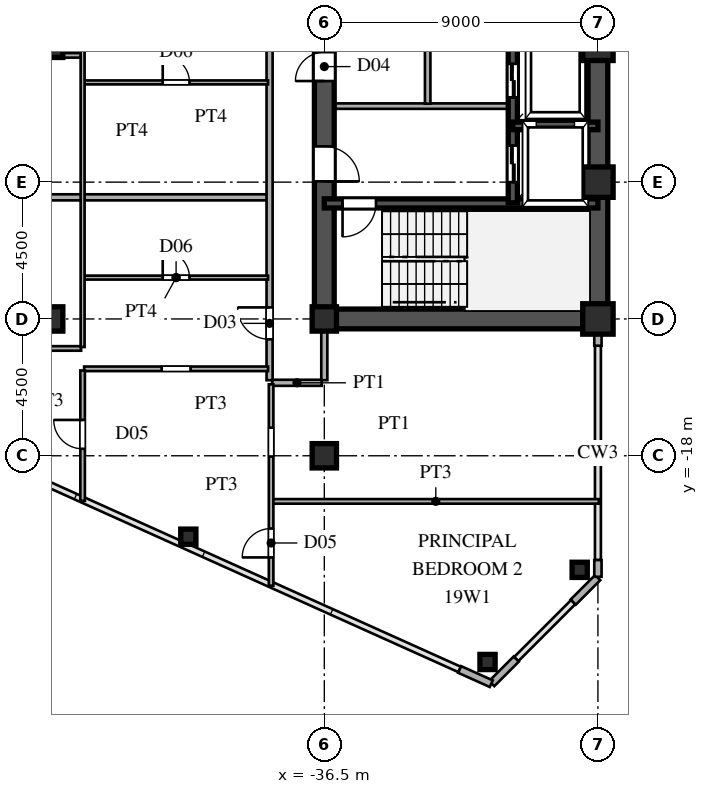
"""IFC4 building model, lengths in metres.
Left out: names, types, materials, properties, quantities, classifications, styles, units other than length and angle.
Written with IfcOpenShell. Run it as: python <this file> out.ifc"""

import sys

from ifc_helpers import new_model, si_unit, direction, frame, frame_2d, origin, origin_2d, place, context, subcontext, project, spatial, rectangle, hollow_rectangle, i_section, extrude, source, transform, mapped, element, fill, save


model = new_model("IFC4")
c1 = context("Model", 3, precision=1e-05, world=origin(), true_north=direction((0.0, 1.0)))
c2 = subcontext(c1, "Body", "Model", "MODEL_VIEW")
j1 = project(units=[si_unit("LENGTHUNIT", "METRE"), si_unit("PLANEANGLEUNIT", "RADIAN")], contexts=[c1])
p1 = place(None, origin())
s1 = spatial("IfcSite", under=j1, at=p1, CompositionType="ELEMENT")
p2 = place(p1, origin())
s2 = spatial("IfcBuilding", under=s1, at=p2, CompositionType="ELEMENT")
p3 = place(p2, frame((0.0, 0.0, 72.9)))
s3 = spatial("IfcBuildingStorey", under=s2, at=p3, CompositionType="ELEMENT", Elevation=72.9)
m1 = source(origin(), c2, "Body", "SweptSolid", [
    extrude(hollow_rectangle(XDim=1.0, YDim=1.0, WallThickness=0.042, at=origin_2d()), origin(), (0.0, 0.0, 1.0), 3.6),
])
for number, where, z_axis, x_axis in (
    (1, (-27.5, -13.5, 0.0), (0.0, 0.0, 1.0), (1.0, 0.0, 0.0)),
    (2, (-27.5, -9.0, 0.0), (0.0, 0.0, 1.0), (1.0, 0.0, 0.0)),
    (3, (-27.5, -4.5, 0.0), (0.0, 0.0, 1.0), (1.0, 0.0, 0.0)),
):
    element("IfcColumn", number, at=place(p3, frame(where, z_axis=z_axis, x_axis=x_axis)), inside=s3, PredefinedType="COLUMN", context=c2, shape_type="MappedRepresentation", body=[
        mapped(m1, transform((0.0, 0.0, 0.0), scale=1.0)),
    ])
m2 = source(origin(), c2, "Body", "SweptSolid", [
    extrude(i_section(OverallWidth=0.8, OverallDepth=0.8, WebThickness=0.032, FlangeThickness=0.05, at=origin_2d()), origin(), (0.0, 0.0, 1.0), 3.6),
])
for number, where, z_axis, x_axis in (
    (4, (-36.5, -18.0, 0.0), (0.0, 0.0, 1.0), (1.0, 0.0, 0.0)),
    (5, (-36.5, -13.5, 0.0), (0.0, 0.0, 1.0), (1.0, 0.0, 0.0)),
    (6, (-45.5, -13.5, 0.0), (0.0, 0.0, 1.0), (1.0, 0.0, 0.0)),
    (7, (-45.5, -4.5, 0.0), (0.0, 0.0, 1.0), (1.0, 0.0, 0.0)),
):
    element("IfcColumn", number, at=place(p3, frame(where, z_axis=z_axis, x_axis=x_axis)), inside=s3, PredefinedType="COLUMN", context=c2, shape_type="MappedRepresentation", body=[
        mapped(m2, transform((0.0, 0.0, 0.0), scale=1.0)),
    ])
m3 = source(origin(), c2, "Body", "SweptSolid", [
    extrude(hollow_rectangle(XDim=0.5, YDim=0.5, WallThickness=0.02, at=origin_2d()), origin(), (0.0, 0.0, 1.0), 3.6),
])
for number, where, z_axis, x_axis in (
    (8, (-28.1, -21.751, 0.0), (0.0, 0.0, 1.0), (1.0, 0.0, 0.0)),
    (9, (-31.131, -24.783, 0.0), (0.0, 0.0, 1.0), (1.0, 0.0, 0.0)),
    (10, (-40.973, -20.661, 0.0), (0.0, 0.0, 1.0), (1.0, 0.0, 0.0)),
):
    element("IfcColumn", number, at=place(p3, frame(where, z_axis=z_axis, x_axis=x_axis)), inside=s3, PredefinedType="COLUMN", context=c2, shape_type="MappedRepresentation", body=[
        mapped(m3, transform((0.0, 0.0, 0.0), scale=1.0)),
    ])
p4 = place(p3, frame((-27.5, -21.98, 0.0), z_axis=(0.0, 0.0, 1.0), x_axis=(0.0, 1.0, 0.0)))
e11 = element("IfcWall", 11, at=p4, inside=s3, PredefinedType="SOLIDWALL", context=c2, shape_type="SweptSolid", body=[
    extrude(rectangle(XDim=0.55, YDim=0.24, at=frame_2d((0.275, 0.0))), origin(), (0.0, 0.0, 1.0), 3.38),
])
p5 = place(p3, frame((-27.5, -14.38, 0.0), z_axis=(0.0, 0.0, 1.0), x_axis=(0.0, 1.0, 0.0)))
e12 = element("IfcWall", 12, at=p5, inside=s3, PredefinedType="SOLIDWALL", context=c2, shape_type="SweptSolid", body=[
    extrude(rectangle(XDim=0.55, YDim=0.24, at=frame_2d((0.275, 0.0))), origin(), (0.0, 0.0, 1.0), 2.88),
])
p6 = place(p3, frame((-32.049, -25.028, 0.0), z_axis=(0.0, 0.0, 1.0), x_axis=(0.911929519623, -0.410346866979, 0.0)))
e13 = element("IfcWall", 13, at=p6, inside=s3, PredefinedType="SOLIDWALL", context=c2, shape_type="SweptSolid", body=[
    extrude(rectangle(XDim=1.14, YDim=0.24, at=frame_2d((0.57, 0.0))), origin(), (0.0, 0.0, 1.0), 3.38),
])
for number, where, z_axis, x_axis in (
    (14, (-30.993, -25.493, 0.0), (0.0, 0.0, 1.0), (0.707, 0.707, 0.0)),
    (15, (-28.313, -22.813, 0.0), (0.0, 0.0, 1.0), (0.707, 0.707, 0.0)),
):
    element("IfcWall", number, at=place(p3, frame(where, z_axis=z_axis, x_axis=x_axis)), inside=s3, PredefinedType="SOLIDWALL", context=c2, shape_type="SweptSolid", body=[
        extrude(rectangle(XDim=1.14, YDim=0.24, at=frame_2d((0.57, 0.0))), origin(), (0.0, 0.0, 1.0), 3.38),
    ])
p7 = place(p3, frame((-27.5, -13.5, 0.0), z_axis=(0.0, 0.0, 1.0), x_axis=(0.0, 1.0, 0.0)))
e16 = element("IfcWall", 16, at=p7, inside=s3, PredefinedType="SHEAR", context=c2, shape_type="SweptSolid", body=[
    extrude(rectangle(XDim=12.2, YDim=0.65, at=frame_2d((6.1, 0.0))), origin(), (0.0, 0.0, 1.0), 3.38),
])
p8 = place(p3, frame((-36.5, -13.5, 0.0), z_axis=(0.0, 0.0, 1.0), x_axis=(1.0, 0.0, 0.0)))
e17 = element("IfcWall", 17, at=p8, inside=s3, PredefinedType="SHEAR", context=c2, shape_type="SweptSolid", body=[
    extrude(rectangle(XDim=9.0, YDim=0.65, at=frame_2d((4.5, 0.0))), origin(), (0.0, 0.0, 1.0), 3.38),
])
p9 = place(p3, frame((-36.5, -13.65, 0.0), z_axis=(0.0, 0.0, 1.0), x_axis=(0.0, 1.0, 0.0)))
e18 = element("IfcWall", 18, at=p9, inside=s3, PredefinedType="SHEAR", context=c2, shape_type="SweptSolid", body=[
    extrude(rectangle(XDim=7.15, YDim=0.65, at=frame_2d((3.575, 0.0))), origin(), (0.0, 0.0, 1.0), 3.38),
])
p10 = place(p9, frame((4.675, 0.0, 0.0)))
e19 = element("IfcOpeningElement", 19, at=p10, cuts=e18, PredefinedType="OPENING", context=c2, shape_type="SweptSolid", body=[
    extrude(rectangle(XDim=1.15, YDim=2.2, at=frame_2d((0.575, 1.1))), frame((0.0, 0.335, 0.0), z_axis=(0.0, -1.0, 0.0), x_axis=(1.0, 0.0, 0.0)), (0.0, 0.0, 1.0), 0.67),
])
p11 = place(p3, frame((-36.5, -6.5, 0.0), z_axis=(0.0, 0.0, 1.0), x_axis=(0.0, 1.0, 0.0)))
e20 = element("IfcWall", 20, at=p11, inside=s3, PredefinedType="SHEAR", context=c2, shape_type="SweptSolid", body=[
    extrude(rectangle(XDim=2.6, YDim=0.65, at=frame_2d((1.3, 0.0))), origin(), (0.0, 0.0, 1.0), 3.38),
])
p12 = place(p11, frame((0.825, 0.0, 0.0)))
e21 = element("IfcOpeningElement", 21, at=p12, cuts=e20, PredefinedType="OPENING", context=c2, shape_type="SweptSolid", body=[
    extrude(rectangle(XDim=0.95, YDim=2.15, at=frame_2d((0.475, 1.075))), frame((0.0, 0.335, 0.0), z_axis=(0.0, -1.0, 0.0), x_axis=(1.0, 0.0, 0.0)), (0.0, 0.0, 1.0), 0.67),
])
p13 = place(p3, frame((-36.5, -9.7, 0.0), z_axis=(0.0, 0.0, 1.0), x_axis=(1.0, 0.0, 0.0)))
e22 = element("IfcWall", 22, at=p13, inside=s3, PredefinedType="SHEAR", context=c2, shape_type="SweptSolid", body=[
    extrude(rectangle(XDim=9.0, YDim=0.3, at=frame_2d((4.5, 0.0))), origin(), (0.0, 0.0, 1.0), 3.38),
])
p14 = place(p13, frame((0.6, 0.0, 0.0)))
e23 = element("IfcOpeningElement", 23, at=p14, cuts=e22, PredefinedType="OPENING", context=c2, shape_type="SweptSolid", body=[
    extrude(rectangle(XDim=1.1, YDim=2.2, at=frame_2d((0.55, 1.1))), frame((0.0, 0.16, 0.0), z_axis=(0.0, -1.0, 0.0), x_axis=(1.0, 0.0, 0.0)), (0.0, 0.0, 1.0), 0.32),
])
p15 = place(p3, frame((-30.3, -7.15, 0.0), z_axis=(0.0, 0.0, 1.0), x_axis=(1.0, 0.0, 0.0)))
e24 = element("IfcWall", 24, at=p15, inside=s3, PredefinedType="SHEAR", context=c2, shape_type="SweptSolid", body=[
    extrude(rectangle(XDim=2.8, YDim=0.25, at=frame_2d((1.4, 0.0))), origin(), (0.0, 0.0, 1.0), 3.38),
])
p16 = place(p3, frame((-30.3, -9.68, 0.0), z_axis=(0.0, 0.0, 1.0), x_axis=(0.0, 1.0, 0.0)))
e25 = element("IfcWall", 25, at=p16, inside=s3, PredefinedType="SHEAR", context=c2, shape_type="SweptSolid", body=[
    extrude(rectangle(XDim=2.56, YDim=0.3, at=frame_2d((1.28, 0.0))), origin(), (0.0, 0.0, 1.0), 3.38),
])
p17 = place(p16, frame((0.68, 0.0, 0.0)))
e26 = element("IfcOpeningElement", 26, at=p17, cuts=e25, PredefinedType="OPENING", context=c2, shape_type="SweptSolid", body=[
    extrude(rectangle(XDim=1.2, YDim=2.25, at=frame_2d((0.6, 1.125))), frame((0.0, 0.16, 0.0), z_axis=(0.0, -1.0, 0.0), x_axis=(1.0, 0.0, 0.0)), (0.0, 0.0, 1.0), 0.32),
])
p18 = place(p3, frame((-30.3, -7.12, 0.0), z_axis=(0.0, 0.0, 1.0), x_axis=(0.0, 1.0, 0.0)))
e27 = element("IfcWall", 27, at=p18, inside=s3, PredefinedType="SHEAR", context=c2, shape_type="SweptSolid", body=[
    extrude(rectangle(XDim=2.92, YDim=0.3, at=frame_2d((1.46, 0.0))), origin(), (0.0, 0.0, 1.0), 3.38),
])
p19 = place(p18, frame((0.91, 0.0, 0.0)))
e28 = element("IfcOpeningElement", 28, at=p19, cuts=e27, PredefinedType="OPENING", context=c2, shape_type="SweptSolid", body=[
    extrude(rectangle(XDim=1.1, YDim=2.2, at=frame_2d((0.55, 1.1))), frame((0.0, 0.16, 0.0), z_axis=(0.0, -1.0, 0.0), x_axis=(1.0, 0.0, 0.0)), (0.0, 0.0, 1.0), 0.32),
])
p20 = place(p3, frame((-36.15, -6.5, 0.0), z_axis=(0.0, 0.0, 1.0), x_axis=(1.0, 0.0, 0.0)))
e29 = element("IfcWall", 29, at=p20, inside=s3, PredefinedType="PARTITIONING", context=c2, shape_type="SweptSolid", body=[
    extrude(rectangle(XDim=5.7, YDim=0.18, at=frame_2d((2.85, 0.0))), origin(), (0.0, 0.0, 1.0), 3.38),
])
p21 = place(p3, frame((-33.1, -6.42, 0.0), z_axis=(0.0, 0.0, 1.0), x_axis=(0.0, 1.0, 0.0)))
e30 = element("IfcWall", 30, at=p21, inside=s3, PredefinedType="PARTITIONING", context=c2, shape_type="SweptSolid", body=[
    extrude(rectangle(XDim=5.04, YDim=0.18, at=frame_2d((2.52, 0.0))), origin(), (0.0, 0.0, 1.0), 3.38),
])
p22 = place(p3, frame((-38.2, -19.5, 0.0), z_axis=(0.0, 0.0, 1.0), x_axis=(1.0, 0.0, 0.0)))
e31 = element("IfcWall", 31, at=p22, inside=s3, PredefinedType="PARTITIONING", context=c2, shape_type="SweptSolid", body=[
    extrude(rectangle(XDim=10.735, YDim=0.15, at=frame_2d((5.367, 0.0))), origin(), (0.0, 0.0, 1.0), 3.38),
])
p23 = place(p3, frame((-38.215, -15.6, 0.0), z_axis=(0.0, 0.0, 1.0), x_axis=(1.0, 0.0, 0.0)))
e32 = element("IfcWall", 32, at=p23, inside=s3, PredefinedType="PARTITIONING", context=c2, shape_type="SweptSolid", body=[
    extrude(rectangle(XDim=1.63, YDim=0.2, at=frame_2d((0.815, 0.0))), origin(), (0.0, 0.0, 1.0), 3.38),
])
p24 = place(p3, frame((-44.4, -15.14, 0.0), z_axis=(0.0, 0.0, 1.0), x_axis=(1.0, 0.0, 0.0)))
e33 = element("IfcWall", 33, at=p24, inside=s3, PredefinedType="PARTITIONING", context=c2, shape_type="SweptSolid", body=[
    extrude(rectangle(XDim=6.05, YDim=0.15, at=frame_2d((3.025, 0.0))), origin(), (0.0, 0.0, 1.0), 3.38),
])
p25 = place(p24, frame((2.55, 0.0, 0.0)))
e34 = element("IfcOpeningElement", 34, at=p25, cuts=e33, PredefinedType="OPENING", context=c2, shape_type="SweptSolid", body=[
    extrude(rectangle(XDim=0.95, YDim=2.15, at=frame_2d((0.475, 1.075))), frame((0.0, 0.085, 0.0), z_axis=(0.0, -1.0, 0.0), x_axis=(1.0, 0.0, 0.0)), (0.0, 0.0, 1.0), 0.17),
])
p26 = place(p3, frame((-54.45, -14.47, 0.0), z_axis=(0.0, 0.0, 1.0), x_axis=(1.0, 0.0, 0.0)))
e35 = element("IfcWall", 35, at=p26, inside=s3, PredefinedType="PARTITIONING", context=c2, shape_type="SweptSolid", body=[
    extrude(rectangle(XDim=9.95, YDim=0.15, at=frame_2d((4.975, 0.0))), origin(), (0.0, 0.0, 1.0), 3.38),
])
p27 = place(p26, frame((4.5, 0.0, 0.0)))
e36 = element("IfcOpeningElement", 36, at=p27, cuts=e35, PredefinedType="OPENING", context=c2, shape_type="SweptSolid", body=[
    extrude(rectangle(XDim=0.95, YDim=2.15, at=frame_2d((0.475, 1.075))), frame((0.0, 0.085, 0.0), z_axis=(0.0, -1.0, 0.0), x_axis=(1.0, 0.0, 0.0)), (0.0, 0.0, 1.0), 0.17),
])
p28 = place(p3, frame((-44.4, -12.14, 0.0), z_axis=(0.0, 0.0, 1.0), x_axis=(1.0, 0.0, 0.0)))
e37 = element("IfcWall", 37, at=p28, inside=s3, PredefinedType="PARTITIONING", context=c2, shape_type="SweptSolid", body=[
    extrude(rectangle(XDim=6.05, YDim=0.13, at=frame_2d((3.025, 0.0))), origin(), (0.0, 0.0, 1.0), 3.38),
])
p29 = place(p28, frame((2.585, 0.0, 0.0)))
e38 = element("IfcOpeningElement", 38, at=p29, cuts=e37, PredefinedType="OPENING", context=c2, shape_type="SweptSolid", body=[
    extrude(rectangle(XDim=0.88, YDim=2.1, at=frame_2d((0.44, 1.05))), frame((0.0, 0.075, 0.0), z_axis=(0.0, -1.0, 0.0), x_axis=(1.0, 0.0, 0.0)), (0.0, 0.0, 1.0), 0.15),
])
p30 = place(p3, frame((-66.568, -9.5, 0.0), z_axis=(0.0, 0.0, 1.0), x_axis=(1.0, 0.0, 0.0)))
e39 = element("IfcWall", 39, at=p30, inside=s3, PredefinedType="PARTITIONING", context=c2, shape_type="SweptSolid", body=[
    extrude(rectangle(XDim=28.188, YDim=0.2, at=frame_2d((14.094, 0.0))), origin(), (0.0, 0.0, 1.0), 3.38),
])
p31 = place(p3, frame((-44.4, -5.72, 0.0), z_axis=(0.0, 0.0, 1.0), x_axis=(1.0, 0.0, 0.0)))
e40 = element("IfcWall", 40, at=p31, inside=s3, PredefinedType="PARTITIONING", context=c2, shape_type="SweptSolid", body=[
    extrude(rectangle(XDim=6.05, YDim=0.13, at=frame_2d((3.025, 0.0))), origin(), (0.0, 0.0, 1.0), 3.38),
])
p32 = place(p31, frame((2.585, 0.0, 0.0)))
e41 = element("IfcOpeningElement", 41, at=p32, cuts=e40, PredefinedType="OPENING", context=c2, shape_type="SweptSolid", body=[
    extrude(rectangle(XDim=0.88, YDim=2.1, at=frame_2d((0.44, 1.05))), frame((0.0, 0.075, 0.0), z_axis=(0.0, -1.0, 0.0), x_axis=(1.0, 0.0, 0.0)), (0.0, 0.0, 1.0), 0.15),
])
p33 = place(p3, frame((-71.035, -4.83, 0.0), z_axis=(0.0, 0.0, 1.0), x_axis=(1.0, 0.0, 0.0)))
e42 = element("IfcWall", 42, at=p33, inside=s3, PredefinedType="PARTITIONING", context=c2, shape_type="SweptSolid", body=[
    extrude(rectangle(XDim=26.535, YDim=0.15, at=frame_2d((13.268, 0.0))), origin(), (0.0, 0.0, 1.0), 3.38),
])
p34 = place(p33, frame((21.085, 0.0, 0.0)))
e43 = element("IfcOpeningElement", 43, at=p34, cuts=e42, PredefinedType="OPENING", context=c2, shape_type="SweptSolid", body=[
    extrude(rectangle(XDim=0.95, YDim=2.15, at=frame_2d((0.475, 1.075))), frame((0.0, 0.085, 0.0), z_axis=(0.0, -1.0, 0.0), x_axis=(1.0, 0.0, 0.0)), (0.0, 0.0, 1.0), 0.17),
])
p35 = place(p33, frame((13.21, 0.0, 0.0)))
e44 = element("IfcOpeningElement", 44, at=p35, cuts=e42, PredefinedType="OPENING", context=c2, shape_type="SweptSolid", body=[
    extrude(rectangle(XDim=0.95, YDim=2.15, at=frame_2d((0.475, 1.075))), frame((0.0, 0.085, 0.0), z_axis=(0.0, -1.0, 0.0), x_axis=(1.0, 0.0, 0.0)), (0.0, 0.0, 1.0), 0.17),
])
p36 = place(p3, frame((-44.45, -19.483, 0.0), z_axis=(0.0, 0.0, 1.0), x_axis=(0.0, 1.0, 0.0)))
e45 = element("IfcWall", 45, at=p36, inside=s3, PredefinedType="PARTITIONING", context=c2, shape_type="SweptSolid", body=[
    extrude(rectangle(XDim=4.288, YDim=0.15, at=frame_2d((2.144, 0.0))), origin(), (0.0, 0.0, 1.0), 3.38),
])
p37 = place(p36, frame((1.712, 0.0, 0.0)))
e46 = element("IfcOpeningElement", 46, at=p37, cuts=e45, PredefinedType="OPENING", context=c2, shape_type="SweptSolid", body=[
    extrude(rectangle(XDim=0.95, YDim=2.15, at=frame_2d((0.475, 1.075))), frame((0.0, 0.085, 0.0), z_axis=(0.0, -1.0, 0.0), x_axis=(1.0, 0.0, 0.0)), (0.0, 0.0, 1.0), 0.17),
])
p38 = place(p3, frame((-44.45, -14.424, 0.0), z_axis=(0.0, 0.0, 1.0), x_axis=(0.0, 1.0, 0.0)))
e47 = element("IfcWall", 47, at=p38, inside=s3, PredefinedType="PARTITIONING", context=c2, shape_type="SweptSolid", body=[
    extrude(rectangle(XDim=14.207, YDim=0.13, at=frame_2d((7.104, 0.0))), origin(), (0.0, 0.0, 1.0), 3.38),
])
p39 = place(p38, frame((11.449, 0.0, 0.0)))
e48 = element("IfcOpeningElement", 48, at=p39, cuts=e47, PredefinedType="OPENING", context=c2, shape_type="SweptSolid", body=[
    extrude(rectangle(XDim=0.95, YDim=2.15, at=frame_2d((0.475, 1.075))), frame((0.0, 0.075, 0.0), z_axis=(0.0, -1.0, 0.0), x_axis=(1.0, 0.0, 0.0)), (0.0, 0.0, 1.0), 0.15),
])
p40 = place(p3, frame((-38.3, -15.515, 0.0), z_axis=(0.0, 0.0, 1.0), x_axis=(0.0, 1.0, 0.0)))
e49 = element("IfcWall", 49, at=p40, inside=s3, PredefinedType="PARTITIONING", context=c2, shape_type="SweptSolid", body=[
    extrude(rectangle(XDim=31.03, YDim=0.2, at=frame_2d((15.515, 0.0))), origin(), (0.0, 0.0, 1.0), 3.38),
])
p41 = place(p40, frame((1.345, 0.0, 0.0)))
e50 = element("IfcOpeningElement", 50, at=p41, cuts=e49, PredefinedType="OPENING", context=c2, shape_type="SweptSolid", body=[
    extrude(rectangle(XDim=1.05, YDim=2.25, at=frame_2d((0.525, 1.125))), frame((0.0, 0.11, 0.0), z_axis=(0.0, -1.0, 0.0), x_axis=(1.0, 0.0, 0.0)), (0.0, 0.0, 1.0), 0.22),
])
p42 = place(p40, frame((12.28, 0.0, 0.0)))
e51 = element("IfcOpeningElement", 51, at=p42, cuts=e49, PredefinedType="OPENING", context=c2, shape_type="SweptSolid", body=[
    extrude(rectangle(XDim=1.05, YDim=2.25, at=frame_2d((0.525, 1.125))), frame((0.0, 0.11, 0.0), z_axis=(0.0, -1.0, 0.0), x_axis=(1.0, 0.0, 0.0)), (0.0, 0.0, 1.0), 0.22),
])
p43 = place(p40, frame((25.067, 0.0, 0.0)))
e52 = element("IfcOpeningElement", 52, at=p43, cuts=e49, PredefinedType="OPENING", context=c2, shape_type="SweptSolid", body=[
    extrude(rectangle(XDim=1.05, YDim=2.25, at=frame_2d((0.525, 1.125))), frame((0.0, 0.11, 0.0), z_axis=(0.0, -1.0, 0.0), x_axis=(1.0, 0.0, 0.0)), (0.0, 0.0, 1.0), 0.22),
])
p44 = place(p3, frame((-38.25, -22.273, 0.0), z_axis=(0.0, 0.0, 1.0), x_axis=(0.0, 1.0, 0.0)))
e53 = element("IfcWall", 53, at=p44, inside=s3, PredefinedType="PARTITIONING", context=c2, shape_type="SweptSolid", body=[
    extrude(rectangle(XDim=6.623, YDim=0.15, at=frame_2d((3.312, 0.0))), origin(), (0.0, 0.0, 1.0), 3.38),
])
p45 = place(p44, frame((0.929, 0.0, 0.0)))
e54 = element("IfcOpeningElement", 54, at=p45, cuts=e53, PredefinedType="OPENING", context=c2, shape_type="SweptSolid", body=[
    extrude(rectangle(XDim=0.95, YDim=2.15, at=frame_2d((0.475, 1.075))), frame((0.0, 0.085, 0.0), z_axis=(0.0, -1.0, 0.0), x_axis=(1.0, 0.0, 0.0)), (0.0, 0.0, 1.0), 0.17),
])
p46 = place(p44, frame((4.248, 0.0, 0.0)))
e55 = element("IfcOpeningElement", 55, at=p46, cuts=e53, PredefinedType="OPENING", context=c2, shape_type="SweptSolid", body=[
    extrude(rectangle(XDim=0.95, YDim=2.15, at=frame_2d((0.475, 1.075))), frame((0.0, 0.085, 0.0), z_axis=(0.0, -1.0, 0.0), x_axis=(1.0, 0.0, 0.0)), (0.0, 0.0, 1.0), 0.17),
])
p47 = place(p3, frame((-36.5, -15.515, 0.0), z_axis=(0.0, 0.0, 1.0), x_axis=(0.0, 1.0, 0.0)))
e56 = element("IfcWall", 56, at=p47, inside=s3, PredefinedType="PARTITIONING", context=c2, shape_type="SweptSolid", body=[
    extrude(rectangle(XDim=1.685, YDim=0.2, at=frame_2d((0.842, 0.0))), origin(), (0.0, 0.0, 1.0), 2.68),
])
m4 = source(origin(), c2, "Body", "SweptSolid", [
    extrude(rectangle(XDim=1.15, YDim=2.2, at=frame_2d((0.575, 1.1))), frame((0.0, 0.025, 0.0), z_axis=(0.0, -1.0, 0.0), x_axis=(1.0, 0.0, 0.0)), (0.0, 0.0, 1.0), 0.05),
])
p48 = place(p10, frame((1.15, 0.0, 0.0), z_axis=(0.0, 0.0, 1.0), x_axis=(-1.0, 0.0, 0.0)))
e57 = element("IfcDoor", 57, at=p48, inside=s3, OperationType="SINGLE_SWING_LEFT", PredefinedType="DOOR", context=c2, shape_type="MappedRepresentation", body=[
    mapped(m4, transform((0.0, 0.0, 0.0), scale=1.0)),
])
fill(e19, e57)
m5 = source(origin(), c2, "Body", "SweptSolid", [
    extrude(rectangle(XDim=0.95, YDim=2.15, at=frame_2d((0.475, 1.075))), frame((0.0, 0.025, 0.0), z_axis=(0.0, -1.0, 0.0), x_axis=(1.0, 0.0, 0.0)), (0.0, 0.0, 1.0), 0.05),
])
p49 = place(p12, origin())
e58 = element("IfcDoor", 58, at=p49, inside=s3, OperationType="SINGLE_SWING_LEFT", PredefinedType="DOOR", context=c2, shape_type="MappedRepresentation", body=[
    mapped(m5, transform((0.0, 0.0, 0.0), scale=1.0)),
])
fill(e21, e58)
m6 = source(origin(), c2, "Body", "SweptSolid", [
    extrude(rectangle(XDim=1.1, YDim=2.2, at=frame_2d((0.55, 1.1))), frame((0.0, 0.025, 0.0), z_axis=(0.0, -1.0, 0.0), x_axis=(1.0, 0.0, 0.0)), (0.0, 0.0, 1.0), 0.05),
])
p50 = place(p14, frame((1.1, 0.0, 0.0), z_axis=(0.0, 0.0, 1.0), x_axis=(-1.0, 0.0, 0.0)))
e59 = element("IfcDoor", 59, at=p50, inside=s3, OperationType="SINGLE_SWING_LEFT", PredefinedType="DOOR", context=c2, shape_type="MappedRepresentation", body=[
    mapped(m6, transform((0.0, 0.0, 0.0), scale=1.0)),
])
fill(e23, e59)
m7 = source(origin(), c2, "Body", "SweptSolid", [
    extrude(rectangle(XDim=1.2, YDim=2.25, at=frame_2d((0.6, 1.125))), frame((0.0, 0.025, 0.0), z_axis=(0.0, -1.0, 0.0), x_axis=(1.0, 0.0, 0.0)), (0.0, 0.0, 1.0), 0.05),
])
p51 = place(p17, origin())
e60 = element("IfcDoor", 60, at=p51, inside=s3, OperationType="DOUBLE_DOOR_SLIDING", PredefinedType="DOOR", context=c2, shape_type="MappedRepresentation", body=[
    mapped(m7, transform((0.0, 0.0, 0.0), scale=1.0)),
])
fill(e26, e60)
m8 = source(origin(), c2, "Body", "SweptSolid", [
    extrude(rectangle(XDim=1.1, YDim=2.2, at=frame_2d((0.55, 1.1))), frame((0.0, 0.025, 0.0), z_axis=(0.0, -1.0, 0.0), x_axis=(1.0, 0.0, 0.0)), (0.0, 0.0, 1.0), 0.05),
])
p52 = place(p19, origin())
e61 = element("IfcDoor", 61, at=p52, inside=s3, OperationType="DOUBLE_DOOR_SLIDING", PredefinedType="DOOR", context=c2, shape_type="MappedRepresentation", body=[
    mapped(m8, transform((0.0, 0.0, 0.0), scale=1.0)),
])
fill(e28, e61)
m9 = source(origin(), c2, "Body", "SweptSolid", [
    extrude(rectangle(XDim=0.88, YDim=2.1, at=frame_2d((0.44, 1.05))), frame((0.0, 0.025, 0.0), z_axis=(0.0, -1.0, 0.0), x_axis=(1.0, 0.0, 0.0)), (0.0, 0.0, 1.0), 0.05),
])
p53 = place(p29, origin())
e62 = element("IfcDoor", 62, at=p53, inside=s3, OperationType="SINGLE_SWING_LEFT", PredefinedType="DOOR", context=c2, shape_type="MappedRepresentation", body=[
    mapped(m9, transform((0.0, 0.0, 0.0), scale=1.0)),
])
fill(e38, e62)
p54 = place(p32, origin())
e63 = element("IfcDoor", 63, at=p54, inside=s3, OperationType="SINGLE_SWING_LEFT", PredefinedType="DOOR", context=c2, shape_type="MappedRepresentation", body=[
    mapped(m9, transform((0.0, 0.0, 0.0), scale=1.0)),
])
fill(e41, e63)
m10 = source(origin(), c2, "Body", "SweptSolid", [
    extrude(rectangle(XDim=0.95, YDim=2.15, at=frame_2d((0.475, 1.075))), frame((0.0, 0.025, 0.0), z_axis=(0.0, -1.0, 0.0), x_axis=(1.0, 0.0, 0.0)), (0.0, 0.0, 1.0), 0.05),
])
p55 = place(p37, origin())
e64 = element("IfcDoor", 64, at=p55, inside=s3, OperationType="SINGLE_SWING_RIGHT", PredefinedType="DOOR", context=c2, shape_type="MappedRepresentation", body=[
    mapped(m10, transform((0.0, 0.0, 0.0), scale=1.0)),
])
fill(e46, e64)
m11 = source(origin(), c2, "Body", "SweptSolid", [
    extrude(rectangle(XDim=1.05, YDim=2.25, at=frame_2d((0.525, 1.125))), frame((0.0, 0.025, 0.0), z_axis=(0.0, -1.0, 0.0), x_axis=(1.0, 0.0, 0.0)), (0.0, 0.0, 1.0), 0.05),
])
p56 = place(p41, origin())
e65 = element("IfcDoor", 65, at=p56, inside=s3, OperationType="SINGLE_SWING_RIGHT", PredefinedType="DOOR", context=c2, shape_type="MappedRepresentation", body=[
    mapped(m11, transform((0.0, 0.0, 0.0), scale=1.0)),
])
fill(e50, e65)
p57 = place(p45, origin())
e66 = element("IfcDoor", 66, at=p57, inside=s3, OperationType="SINGLE_SWING_LEFT", PredefinedType="DOOR", context=c2, shape_type="MappedRepresentation", body=[
    mapped(m10, transform((0.0, 0.0, 0.0), scale=1.0)),
])
fill(e54, e66)
save(model, sys.argv[1])
